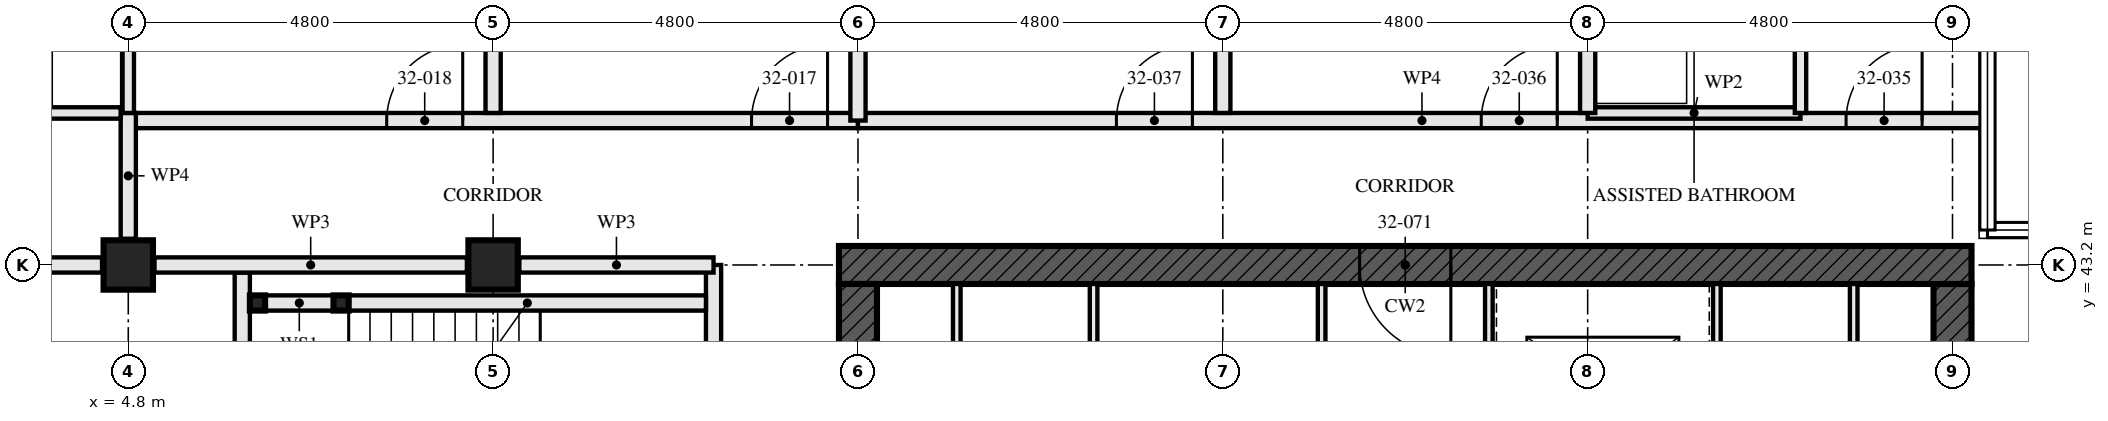
"""IFC4 building model, lengths in metres.
Left out: names, types, materials, properties, quantities, classifications, styles, units other than length and angle.
Written with IfcOpenShell. Run it as: python <this file> out.ifc"""

import sys

from ifc_helpers import new_model, si_unit, direction, frame, frame_2d, origin, origin_2d, place, context, subcontext, project, spatial, rectangle, hollow_rectangle, extrude, element, fill, save


model = new_model("IFC4")
c1 = context("Model", 3, precision=1e-05, world=origin(), true_north=direction((0.0, 1.0)))
c2 = subcontext(c1, "Body", "Model", "MODEL_VIEW")
j1 = project(units=[si_unit("LENGTHUNIT", "METRE"), si_unit("PLANEANGLEUNIT", "RADIAN")], contexts=[c1])
p1 = place(None, origin())
s1 = spatial("IfcSite", under=j1, at=p1, CompositionType="ELEMENT")
p2 = place(p1, origin())
s2 = spatial("IfcBuilding", under=s1, at=p2, CompositionType="ELEMENT")
p3 = place(p2, frame((0.0, 0.0, 119.0)))
s3 = spatial("IfcBuildingStorey", under=s2, at=p3, CompositionType="ELEMENT", Elevation=119.0)
for number, where, z_axis, x_axis in (
    (1, (4.8, 43.2, 0.0), (0.0, 0.0, 1.0), (0.0, 1.0, 0.0)),
    (2, (9.6, 43.2, 0.0), (0.0, 0.0, 1.0), (0.0, 1.0, 0.0)),
):
    element("IfcColumn", number, at=place(p3, frame(where, z_axis=z_axis, x_axis=x_axis)), inside=s3, PredefinedType="COLUMN", context=c2, shape_type="SweptSolid", body=[
        extrude(hollow_rectangle(XDim=0.65, YDim=0.65, WallThickness=0.05, at=origin_2d()), origin(), (0.0, 0.0, 1.0), 3.5),
    ])
p4 = place(p3, frame((29.05, 43.2, -0.17), z_axis=(0.0, 0.0, 1.0), x_axis=(-1.0, 0.0, 0.0)))
e3 = element("IfcWall", 3, at=p4, inside=s3, PredefinedType="SHEAR", context=c2, shape_type="SweptSolid", body=[
    extrude(rectangle(XDim=14.9, YDim=0.5, at=frame_2d((7.45, 0.0))), origin(), (0.0, 0.0, 1.0), 3.5),
])
p5 = place(p4, frame((6.85, 0.0, 0.17)))
e4 = element("IfcOpeningElement", 4, at=p5, cuts=e3, PredefinedType="OPENING", context=c2, shape_type="SweptSolid", body=[
    extrude(rectangle(XDim=1.2, YDim=2.1, at=frame_2d((0.6, 1.05))), frame((0.0, 0.26, 0.0), z_axis=(0.0, -1.0, 0.0), x_axis=(1.0, 0.0, 0.0)), (0.0, 0.0, 1.0), 0.521),
])
p6 = place(p3, frame((14.4, 42.95, -0.17), z_axis=(0.0, 0.0, 1.0), x_axis=(0.0, -1.0, 0.0)))
e5 = element("IfcWall", 5, at=p6, inside=s3, PredefinedType="SHEAR", context=c2, shape_type="SweptSolid", body=[
    extrude(rectangle(XDim=13.9, YDim=0.5, at=frame_2d((6.95, 0.0))), origin(), (0.0, 0.0, 1.0), 3.5),
])
p7 = place(p6, frame((6.35, 0.0, 0.17)))
e6 = element("IfcOpeningElement", 6, at=p7, cuts=e5, PredefinedType="OPENING", context=c2, shape_type="SweptSolid", body=[
    extrude(rectangle(XDim=1.2, YDim=2.1, at=frame_2d((0.6, 1.05))), frame((0.0, 0.26, 0.0), z_axis=(0.0, -1.0, 0.0), x_axis=(1.0, 0.0, 0.0)), (0.0, 0.0, 1.0), 0.521),
])
p8 = place(p3, frame((28.8, 29.05, -0.17), z_axis=(0.0, 0.0, 1.0), x_axis=(0.0, 1.0, 0.0)))
e7 = element("IfcWall", 7, at=p8, inside=s3, PredefinedType="SHEAR", context=c2, shape_type="SweptSolid", body=[
    extrude(rectangle(XDim=13.9, YDim=0.5, at=frame_2d((6.95, 0.0))), origin(), (0.0, 0.0, 1.0), 3.5),
])
p9 = place(p8, frame((6.35, 0.0, 0.17)))
e8 = element("IfcOpeningElement", 8, at=p9, cuts=e7, PredefinedType="OPENING", context=c2, shape_type="SweptSolid", body=[
    extrude(rectangle(XDim=1.2, YDim=2.1, at=frame_2d((0.6, 1.05))), frame((0.0, 0.26, 0.0), z_axis=(0.0, -1.0, 0.0), x_axis=(1.0, 0.0, 0.0)), (0.0, 0.0, 1.0), 0.521),
])
for number, where, z_axis, x_axis in (
    (9, (6.5, 42.7, 0.0), (0.0, 0.0, 1.0), (1.0, 0.0, 0.0)),
    (10, (7.6, 42.7, 0.0), (0.0, 0.0, 1.0), (1.0, 0.0, 0.0)),
):
    element("IfcColumn", number, at=place(p3, frame(where, z_axis=z_axis, x_axis=x_axis)), inside=s3, PredefinedType="COLUMN", context=c2, shape_type="SweptSolid", body=[
        extrude(hollow_rectangle(XDim=0.2, YDim=0.2, WallThickness=0.008, at=origin_2d()), origin(), (0.0, 0.0, 1.0), 3.33),
    ])
p10 = place(p3, frame((6.6, 42.7, 0.0), z_axis=(0.0, 0.0, 1.0), x_axis=(1.0, 0.0, 0.0)))
e11 = element("IfcWall", 11, at=p10, inside=s3, PredefinedType="SOLIDWALL", context=c2, shape_type="SweptSolid", body=[
    extrude(rectangle(XDim=0.9, YDim=0.2, at=frame_2d((0.45, 0.0))), origin(), (0.0, 0.0, 1.0), 2.99),
])
p11 = place(p3, frame((7.7, 42.7, 0.0), z_axis=(0.0, 0.0, 1.0), x_axis=(1.0, 0.0, 0.0)))
e12 = element("IfcWall", 12, at=p11, inside=s3, PredefinedType="SOLIDWALL", context=c2, shape_type="SweptSolid", body=[
    extrude(rectangle(XDim=4.7, YDim=0.2, at=frame_2d((2.35, 0.0))), origin(), (0.0, 0.0, 1.0), 2.99),
])
p12 = place(p3, frame((6.3, 43.1, 0.0), z_axis=(0.0, 0.0, 1.0), x_axis=(0.0, -1.0, 0.0)))
e13 = element("IfcWall", 13, at=p12, inside=s3, PredefinedType="SOLIDWALL", context=c2, shape_type="SweptSolid", body=[
    extrude(rectangle(XDim=3.3, YDim=0.2, at=frame_2d((1.65, 0.0))), origin(), (0.0, 0.0, 1.0), 3.33),
])
p13 = place(p3, frame((12.5, 43.2, 0.0), z_axis=(0.0, 0.0, 1.0), x_axis=(0.0, -1.0, 0.0)))
e14 = element("IfcWall", 14, at=p13, inside=s3, PredefinedType="PARTITIONING", context=c2, shape_type="SweptSolid", body=[
    extrude(rectangle(XDim=14.84, YDim=0.2, at=frame_2d((7.42, 0.0))), origin(), (0.0, 0.0, 1.0), 2.32),
])
p14 = place(p13, frame((1.4, 0.0, 0.0)))
e15 = element("IfcOpeningElement", 15, at=p14, cuts=e14, PredefinedType="OPENING", context=c2, shape_type="SweptSolid", body=[
    extrude(rectangle(XDim=1.0, YDim=2.1, at=frame_2d((0.5, 1.05))), frame((0.0, 0.111, 0.0), z_axis=(0.0, -1.0, 0.0), x_axis=(1.0, 0.0, 0.0)), (0.0, 0.0, 1.0), 0.221),
])
p15 = place(p13, frame((5.2, 0.0, 0.0)))
e16 = element("IfcOpeningElement", 16, at=p15, cuts=e14, PredefinedType="OPENING", context=c2, shape_type="SweptSolid", body=[
    extrude(rectangle(XDim=1.0, YDim=2.1, at=frame_2d((0.5, 1.05))), frame((0.0, 0.111, 0.0), z_axis=(0.0, -1.0, 0.0), x_axis=(1.0, 0.0, 0.0)), (0.0, 0.0, 1.0), 0.221),
])
p16 = place(p13, frame((13.0, 0.0, 0.0)))
e17 = element("IfcOpeningElement", 17, at=p16, cuts=e14, PredefinedType="OPENING", context=c2, shape_type="SweptSolid", body=[
    extrude(rectangle(XDim=1.0, YDim=2.1, at=frame_2d((0.5, 1.05))), frame((0.0, 0.111, 0.0), z_axis=(0.0, -1.0, 0.0), x_axis=(1.0, 0.0, 0.0)), (0.0, 0.0, 1.0), 0.221),
])
p17 = place(p3, frame((9.6, 57.28, 0.0), z_axis=(0.0, 0.0, 1.0), x_axis=(0.0, -1.0, 0.0)))
e18 = element("IfcWall", 18, at=p17, inside=s3, PredefinedType="PARTITIONING", context=c2, shape_type="SweptSolid", body=[
    extrude(rectangle(XDim=12.08, YDim=0.2, at=frame_2d((6.04, 0.0))), origin(), (0.0, 0.0, 1.0), 2.55),
])
p18 = place(p3, frame((4.8, 48.2, 0.0), z_axis=(0.0, 0.0, 1.0), x_axis=(0.0, -1.0, 0.0)))
e19 = element("IfcWall", 19, at=p18, inside=s3, PredefinedType="PARTITIONING", context=c2, shape_type="SweptSolid", body=[
    extrude(rectangle(XDim=3.0, YDim=0.15, at=frame_2d((1.5, 0.0))), origin(), (0.0, 0.0, 1.0), 2.55),
])
p19 = place(p3, frame((14.4, 45.1, 0.0), z_axis=(0.0, 0.0, 1.0), x_axis=(-1.0, 0.0, 0.0)))
e20 = element("IfcWall", 20, at=p19, inside=s3, PredefinedType="PARTITIONING", context=c2, shape_type="SweptSolid", body=[
    extrude(rectangle(XDim=9.6, YDim=0.2, at=frame_2d((4.8, 0.0))), origin(), (0.0, 0.0, 1.0), 3.33),
])
p20 = place(p19, frame((0.4, 0.0, 0.0)))
e21 = element("IfcOpeningElement", 21, at=p20, cuts=e20, PredefinedType="OPENING", context=c2, shape_type="SweptSolid", body=[
    extrude(rectangle(XDim=1.0, YDim=2.1, at=frame_2d((0.5, 1.05))), frame((0.0, 0.111, 0.0), z_axis=(0.0, -1.0, 0.0), x_axis=(1.0, 0.0, 0.0)), (0.0, 0.0, 1.0), 0.221),
])
p21 = place(p19, frame((5.2, 0.0, 0.0)))
e22 = element("IfcOpeningElement", 22, at=p21, cuts=e20, PredefinedType="OPENING", context=c2, shape_type="SweptSolid", body=[
    extrude(rectangle(XDim=1.0, YDim=2.1, at=frame_2d((0.5, 1.05))), frame((0.0, 0.111, 0.0), z_axis=(0.0, -1.0, 0.0), x_axis=(1.0, 0.0, 0.0)), (0.0, 0.0, 1.0), 0.221),
])
p22 = place(p3, frame((4.8, 45.2, 0.0), z_axis=(0.0, 0.0, 1.0), x_axis=(0.0, -1.0, 0.0)))
e23 = element("IfcWall", 23, at=p22, inside=s3, PredefinedType="PARTITIONING", context=c2, shape_type="SweptSolid", body=[
    extrude(rectangle(XDim=1.655, YDim=0.2, at=frame_2d((0.828, 0.0))), origin(), (0.0, 0.0, 1.0), 3.33),
])
p23 = place(p3, frame((26.8, 48.2, 0.0), z_axis=(0.0, 0.0, 1.0), x_axis=(0.0, -1.0, 0.0)))
e24 = element("IfcWall", 24, at=p23, inside=s3, PredefinedType="PARTITIONING", context=c2, shape_type="SweptSolid", body=[
    extrude(rectangle(XDim=3.0, YDim=0.15, at=frame_2d((1.5, 0.0))), origin(), (0.0, 0.0, 1.0), 2.55),
])
p24 = place(p23, frame((1.05, 0.0, 0.0)))
e25 = element("IfcOpeningElement", 25, at=p24, cuts=e24, PredefinedType="OPENING", context=c2, shape_type="SweptSolid", body=[
    extrude(rectangle(XDim=0.9, YDim=2.1, at=frame_2d((0.45, 1.05))), frame((0.0, 0.085, 0.0), z_axis=(0.0, -1.0, 0.0), x_axis=(1.0, 0.0, 0.0)), (0.0, 0.0, 1.0), 0.171),
])
p25 = place(p3, frame((26.8, 45.2, 0.0), z_axis=(0.0, 0.0, 1.0), x_axis=(-1.0, 0.0, 0.0)))
e26 = element("IfcWall", 26, at=p25, inside=s3, PredefinedType="PARTITIONING", context=c2, shape_type="SweptSolid", body=[
    extrude(rectangle(XDim=2.8, YDim=0.15, at=frame_2d((1.4, 0.0))), origin(), (0.0, 0.0, 1.0), 3.33),
])
p26 = place(p3, frame((24.0, 52.48, 0.0), z_axis=(0.0, 0.0, 1.0), x_axis=(0.0, -1.0, 0.0)))
e27 = element("IfcWall", 27, at=p26, inside=s3, PredefinedType="PARTITIONING", context=c2, shape_type="SweptSolid", body=[
    extrude(rectangle(XDim=7.28, YDim=0.2, at=frame_2d((3.64, 0.0))), origin(), (0.0, 0.0, 1.0), 2.55),
])
p27 = place(p3, frame((19.2, 57.28, 0.0), z_axis=(0.0, 0.0, 1.0), x_axis=(0.0, -1.0, 0.0)))
e28 = element("IfcWall", 28, at=p27, inside=s3, PredefinedType="PARTITIONING", context=c2, shape_type="SweptSolid", body=[
    extrude(rectangle(XDim=12.08, YDim=0.2, at=frame_2d((6.04, 0.0))), origin(), (0.0, 0.0, 1.0), 2.55),
])
p28 = place(p3, frame((29.24, 45.1, 0.0), z_axis=(0.0, 0.0, 1.0), x_axis=(-1.0, 0.0, 0.0)))
e29 = element("IfcWall", 29, at=p28, inside=s3, PredefinedType="PARTITIONING", context=c2, shape_type="SweptSolid", body=[
    extrude(rectangle(XDim=14.84, YDim=0.2, at=frame_2d((7.42, 0.0))), origin(), (0.0, 0.0, 1.0), 2.32),
])
p29 = place(p28, frame((0.84, 0.0, 0.0)))
e30 = element("IfcOpeningElement", 30, at=p29, cuts=e29, PredefinedType="OPENING", context=c2, shape_type="SweptSolid", body=[
    extrude(rectangle(XDim=1.0, YDim=2.1, at=frame_2d((0.5, 1.05))), frame((0.0, 0.111, 0.0), z_axis=(0.0, -1.0, 0.0), x_axis=(1.0, 0.0, 0.0)), (0.0, 0.0, 1.0), 0.221),
])
p30 = place(p28, frame((5.64, 0.0, 0.0)))
e31 = element("IfcOpeningElement", 31, at=p30, cuts=e29, PredefinedType="OPENING", context=c2, shape_type="SweptSolid", body=[
    extrude(rectangle(XDim=1.0, YDim=2.1, at=frame_2d((0.5, 1.05))), frame((0.0, 0.111, 0.0), z_axis=(0.0, -1.0, 0.0), x_axis=(1.0, 0.0, 0.0)), (0.0, 0.0, 1.0), 0.221),
])
p31 = place(p28, frame((10.44, 0.0, 0.0)))
e32 = element("IfcOpeningElement", 32, at=p31, cuts=e29, PredefinedType="OPENING", context=c2, shape_type="SweptSolid", body=[
    extrude(rectangle(XDim=1.0, YDim=2.1, at=frame_2d((0.5, 1.05))), frame((0.0, 0.111, 0.0), z_axis=(0.0, -1.0, 0.0), x_axis=(1.0, 0.0, 0.0)), (0.0, 0.0, 1.0), 0.221),
])
for number, where, z_axis, x_axis in (
    (33, (15.7, 37.15, 0.0), (0.0, 0.0, 1.0), (0.0, 1.0, 0.0)),
    (34, (27.5, 37.15, 0.0), (0.0, 0.0, 1.0), (0.0, 1.0, 0.0)),
):
    element("IfcWall", number, at=place(p3, frame(where, z_axis=z_axis, x_axis=x_axis)), inside=s3, PredefinedType="SOLIDWALL", context=c2, shape_type="SweptSolid", body=[
        extrude(rectangle(XDim=5.8, YDim=0.1, at=frame_2d((2.9, 0.0))), origin(), (0.0, 0.0, 1.0), 3.33),
    ])
p32 = place(p3, frame((20.5, 37.15, 0.0), z_axis=(0.0, 0.0, 1.0), x_axis=(0.0, 1.0, 0.0)))
e35 = element("IfcWall", 35, at=p32, inside=s3, PredefinedType="SOLIDWALL", context=c2, shape_type="SweptSolid", body=[
    extrude(rectangle(XDim=5.8, YDim=0.1, at=frame_2d((2.9, 0.0))), origin(), (0.0, 0.0, 1.0), 3.33),
])
p33 = place(p32, frame((0.975, 0.0, 0.0)))
e36 = element("IfcOpeningElement", 36, at=p33, cuts=e35, PredefinedType="OPENING", context=c2, shape_type="SweptSolid", body=[
    extrude(rectangle(XDim=0.9, YDim=2.1, at=frame_2d((0.45, 1.05))), frame((0.0, 0.061, 0.0), z_axis=(0.0, -1.0, 0.0), x_axis=(1.0, 0.0, 0.0)), (0.0, 0.0, 1.0), 0.121),
])
p34 = place(p3, frame((22.7, 37.15, 0.0), z_axis=(0.0, 0.0, 1.0), x_axis=(0.0, 1.0, 0.0)))
e37 = element("IfcWall", 37, at=p34, inside=s3, PredefinedType="SOLIDWALL", context=c2, shape_type="SweptSolid", body=[
    extrude(rectangle(XDim=5.8, YDim=0.1, at=frame_2d((2.9, 0.0))), origin(), (0.0, 0.0, 1.0), 3.33),
])
p35 = place(p34, frame((0.925, 0.0, 0.0)))
e38 = element("IfcOpeningElement", 38, at=p35, cuts=e37, PredefinedType="OPENING", context=c2, shape_type="SweptSolid", body=[
    extrude(rectangle(XDim=1.0, YDim=2.1, at=frame_2d((0.5, 1.05))), frame((0.0, 0.061, 0.0), z_axis=(0.0, -1.0, 0.0), x_axis=(1.0, 0.0, 0.0)), (0.0, 0.0, 1.0), 0.121),
])
p36 = place(p34, frame((3.9, 0.0, 0.0)))
e39 = element("IfcOpeningElement", 39, at=p36, cuts=e37, PredefinedType="OPENING", context=c2, shape_type="SweptSolid", body=[
    extrude(rectangle(XDim=1.0, YDim=2.1, at=frame_2d((0.5, 1.05))), frame((0.0, 0.061, 0.0), z_axis=(0.0, -1.0, 0.0), x_axis=(1.0, 0.0, 0.0)), (0.0, 0.0, 1.0), 0.121),
])
for number, where, z_axis, x_axis in (
    (40, (17.5, 37.15, 0.0), (0.0, 0.0, 1.0), (0.0, 1.0, 0.0)),
    (41, (25.7, 37.15, 0.0), (0.0, 0.0, 1.0), (0.0, 1.0, 0.0)),
):
    element("IfcWall", number, at=place(p3, frame(where, z_axis=z_axis, x_axis=x_axis)), inside=s3, PredefinedType="SOLIDWALL", context=c2, shape_type="SweptSolid", body=[
        extrude(rectangle(XDim=5.8, YDim=0.1, at=frame_2d((2.9, 0.0))), origin(), (0.0, 0.0, 1.0), 3.33),
    ])
p37 = place(p3, frame((12.5, 43.2, 0.0), z_axis=(0.0, 0.0, 1.0), x_axis=(-1.0, 0.0, 0.0)))
e42 = element("IfcWall", 42, at=p37, inside=s3, PredefinedType="PARTITIONING", context=c2, shape_type="SweptSolid", body=[
    extrude(rectangle(XDim=2.555, YDim=0.2, at=frame_2d((1.277, 0.0))), origin(), (0.0, 0.0, 1.0), 2.32),
])
p38 = place(p3, frame((9.255, 43.2, 0.0), z_axis=(0.0, 0.0, 1.0), x_axis=(-1.0, 0.0, 0.0)))
e43 = element("IfcWall", 43, at=p38, inside=s3, PredefinedType="PARTITIONING", context=c2, shape_type="SweptSolid", body=[
    extrude(rectangle(XDim=4.11, YDim=0.2, at=frame_2d((2.055, 0.0))), origin(), (0.0, 0.0, 1.0), 2.32),
])
p39 = place(p3, frame((4.455, 43.2, 0.0), z_axis=(0.0, 0.0, 1.0), x_axis=(-1.0, 0.0, 0.0)))
e44 = element("IfcWall", 44, at=p39, inside=s3, PredefinedType="PARTITIONING", context=c2, shape_type="SweptSolid", body=[
    extrude(rectangle(XDim=4.135, YDim=0.2, at=frame_2d((2.067, 0.0))), origin(), (0.0, 0.0, 1.0), 2.32),
])
p40 = place(p3, frame((14.4, 45.1, 0.0), z_axis=(0.0, 0.0, 1.0), x_axis=(0.0, 1.0, 0.0)))
e45 = element("IfcWall", 45, at=p40, inside=s3, PredefinedType="PARTITIONING", context=c2, shape_type="SweptSolid", body=[
    extrude(rectangle(XDim=2.555, YDim=0.2, at=frame_2d((1.277, 0.0))), origin(), (0.0, 0.0, 1.0), 2.32),
])
p41 = place(p3, frame((4.7, 45.2, 0.0), z_axis=(0.0, 0.0, 1.0), x_axis=(-1.0, 0.0, 0.0)))
e46 = element("IfcWall", 46, at=p41, inside=s3, PredefinedType="PARTITIONING", context=c2, shape_type="SweptSolid", body=[
    extrude(rectangle(XDim=5.14, YDim=0.15, at=frame_2d((2.57, 0.0))), origin(), (0.0, 0.0, 1.0), 2.32),
])
p42 = place(p20, frame((1.0, 0.0, 0.0), z_axis=(0.0, 0.0, 1.0), x_axis=(-1.0, 0.0, 0.0)))
e47 = element("IfcDoor", 47, at=p42, inside=s3, OperationType="SINGLE_SWING_LEFT", PredefinedType="DOOR", context=c2, shape_type="SweptSolid", body=[
    extrude(rectangle(XDim=1.0, YDim=2.1, at=frame_2d((0.5, 1.05))), frame((0.0, 0.027, 0.0), z_axis=(0.0, -1.0, 0.0), x_axis=(1.0, 0.0, 0.0)), (0.0, 0.0, 1.0), 0.054),
])
fill(e21, e47)
p43 = place(p21, frame((1.0, 0.0, 0.0), z_axis=(0.0, 0.0, 1.0), x_axis=(-1.0, 0.0, 0.0)))
e48 = element("IfcDoor", 48, at=p43, inside=s3, OperationType="SINGLE_SWING_LEFT", PredefinedType="DOOR", context=c2, shape_type="SweptSolid", body=[
    extrude(rectangle(XDim=1.0, YDim=2.1, at=frame_2d((0.5, 1.05))), frame((0.0, 0.027, 0.0), z_axis=(0.0, -1.0, 0.0), x_axis=(1.0, 0.0, 0.0)), (0.0, 0.0, 1.0), 0.054),
])
fill(e22, e48)
p44 = place(p29, frame((1.0, 0.0, 0.0), z_axis=(0.0, 0.0, 1.0), x_axis=(-1.0, 0.0, 0.0)))
e49 = element("IfcDoor", 49, at=p44, inside=s3, OperationType="SINGLE_SWING_LEFT", PredefinedType="DOOR", context=c2, shape_type="SweptSolid", body=[
    extrude(rectangle(XDim=1.0, YDim=2.1, at=frame_2d((0.5, 1.05))), frame((0.0, 0.027, 0.0), z_axis=(0.0, -1.0, 0.0), x_axis=(1.0, 0.0, 0.0)), (0.0, 0.0, 1.0), 0.054),
])
fill(e30, e49)
p45 = place(p30, frame((1.0, 0.0, 0.0), z_axis=(0.0, 0.0, 1.0), x_axis=(-1.0, 0.0, 0.0)))
e50 = element("IfcDoor", 50, at=p45, inside=s3, OperationType="SINGLE_SWING_LEFT", PredefinedType="DOOR", context=c2, shape_type="SweptSolid", body=[
    extrude(rectangle(XDim=1.0, YDim=2.1, at=frame_2d((0.5, 1.05))), frame((0.0, 0.027, 0.0), z_axis=(0.0, -1.0, 0.0), x_axis=(1.0, 0.0, 0.0)), (0.0, 0.0, 1.0), 0.054),
])
fill(e31, e50)
p46 = place(p31, frame((1.0, 0.0, 0.0), z_axis=(0.0, 0.0, 1.0), x_axis=(-1.0, 0.0, 0.0)))
e51 = element("IfcDoor", 51, at=p46, inside=s3, OperationType="SINGLE_SWING_LEFT", PredefinedType="DOOR", context=c2, shape_type="SweptSolid", body=[
    extrude(rectangle(XDim=1.0, YDim=2.1, at=frame_2d((0.5, 1.05))), frame((0.0, 0.027, 0.0), z_axis=(0.0, -1.0, 0.0), x_axis=(1.0, 0.0, 0.0)), (0.0, 0.0, 1.0), 0.054),
])
fill(e32, e51)
p47 = place(p5, origin())
e52 = element("IfcDoor", 52, at=p47, inside=s3, OperationType="SINGLE_SWING_LEFT", PredefinedType="DOOR", context=c2, shape_type="SweptSolid", body=[
    extrude(rectangle(XDim=1.2, YDim=2.1, at=frame_2d((0.6, 1.05))), frame((0.0, 0.027, 0.0), z_axis=(0.0, -1.0, 0.0), x_axis=(1.0, 0.0, 0.0)), (0.0, 0.0, 1.0), 0.054),
])
fill(e4, e52)
save(model, sys.argv[1])
